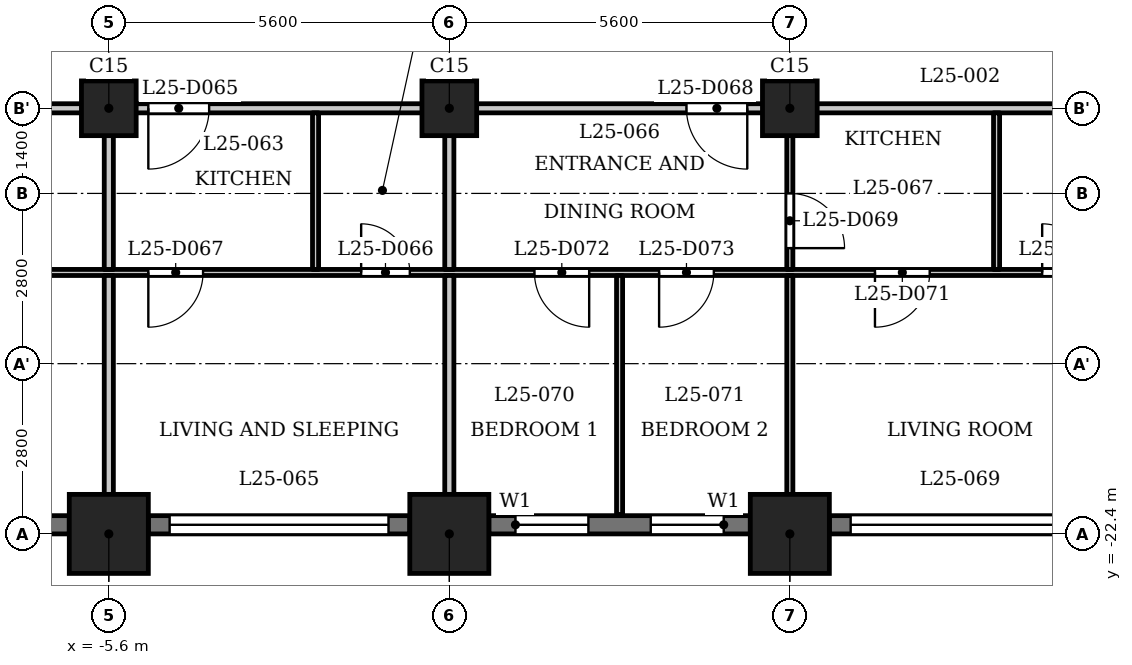
"""IFC4 building model, lengths in metres.
Left out: names, types, materials, properties, quantities, classifications, styles, units other than length and angle.
Written with IfcOpenShell. Run it as: python <this file> out.ifc"""

import sys

from ifc_helpers import new_model, si_unit, direction, frame, frame_2d, origin, origin_2d, place, context, subcontext, project, spatial, rectangle, extrude, element, fill, save


model = new_model("IFC4")
c1 = context("Model", 3, precision=1e-05, world=origin(), true_north=direction((0.0, 1.0)))
c2 = subcontext(c1, "Body", "Model", "MODEL_VIEW")
j1 = project(units=[si_unit("LENGTHUNIT", "METRE"), si_unit("PLANEANGLEUNIT", "RADIAN")], contexts=[c1])
p1 = place(None, origin())
s1 = spatial("IfcSite", under=j1, at=p1, CompositionType="ELEMENT")
p2 = place(p1, origin())
s2 = spatial("IfcBuilding", under=s1, at=p2, CompositionType="ELEMENT")
p3 = place(p2, frame((0.0, 0.0, 100.8)))
s3 = spatial("IfcBuildingStorey", under=s2, at=p3, CompositionType="ELEMENT", Elevation=100.8)
for number, where, z_axis, x_axis in (
    (1, (-5.6, -22.4, 0.0), (0.0, 0.0, 1.0), (1.0, 0.0, 0.0)),
    (2, (0.0, -22.4, 0.0), (0.0, 0.0, 1.0), (1.0, 0.0, 0.0)),
    (3, (5.6, -22.4, 0.0), (0.0, 0.0, 1.0), (1.0, 0.0, 0.0)),
):
    element("IfcColumn", number, at=place(p3, frame(where, z_axis=z_axis, x_axis=x_axis)), inside=s3, PredefinedType="COLUMN", context=c2, shape_type="SweptSolid", body=[
        extrude(rectangle(XDim=1.3, YDim=1.3, at=origin_2d()), origin(), (0.0, 0.0, 1.0), 3.5),
    ])
for number, where, z_axis, x_axis in (
    (4, (-5.6, -15.4, 0.0), (0.0, 0.0, 1.0), (1.0, 0.0, 0.0)),
    (5, (0.0, -15.4, 0.0), (0.0, 0.0, 1.0), (1.0, 0.0, 0.0)),
    (6, (5.6, -15.4, 0.0), (0.0, 0.0, 1.0), (1.0, 0.0, 0.0)),
):
    element("IfcColumn", number, at=place(p3, frame(where, z_axis=z_axis, x_axis=x_axis)), inside=s3, PredefinedType="COLUMN", context=c2, shape_type="SweptSolid", body=[
        extrude(rectangle(XDim=0.9, YDim=0.9, at=origin_2d()), origin(), (0.0, 0.0, 1.0), 3.5),
    ])
p4 = place(p3, frame((-10.55, -22.25, 0.0), z_axis=(0.0, 0.0, 1.0), x_axis=(1.0, 0.0, 0.0)))
e7 = element("IfcWall", 7, at=p4, inside=s3, PredefinedType="SOLIDWALL", context=c2, shape_type="SweptSolid", body=[
    extrude(rectangle(XDim=4.3, YDim=0.3, at=frame_2d((2.15, 0.0))), origin(), (0.0, 0.0, 1.0), 2.4),
])
p5 = place(p4, frame((0.35, 0.0, 1.2)))
e8 = element("IfcOpeningElement", 8, at=p5, cuts=e7, PredefinedType="OPENING", context=c2, shape_type="SweptSolid", body=[
    extrude(rectangle(XDim=3.6, YDim=0.95, at=frame_2d((1.8, 0.475))), frame((0.0, 0.16, 0.0), z_axis=(0.0, -1.0, 0.0), x_axis=(1.0, 0.0, 0.0)), (0.0, 0.0, 1.0), 0.32),
])
p6 = place(p3, frame((-4.95, -22.25, 0.0), z_axis=(0.0, 0.0, 1.0), x_axis=(1.0, 0.0, 0.0)))
e9 = element("IfcWall", 9, at=p6, inside=s3, PredefinedType="SOLIDWALL", context=c2, shape_type="SweptSolid", body=[
    extrude(rectangle(XDim=4.3, YDim=0.3, at=frame_2d((2.15, 0.0))), origin(), (0.0, 0.0, 1.0), 2.4),
])
p7 = place(p6, frame((0.35, 0.0, 1.2)))
e10 = element("IfcOpeningElement", 10, at=p7, cuts=e9, PredefinedType="OPENING", context=c2, shape_type="SweptSolid", body=[
    extrude(rectangle(XDim=3.6, YDim=0.95, at=frame_2d((1.8, 0.475))), frame((0.0, 0.16, 0.0), z_axis=(0.0, -1.0, 0.0), x_axis=(1.0, 0.0, 0.0)), (0.0, 0.0, 1.0), 0.32),
])
p8 = place(p3, frame((0.65, -22.25, 0.0), z_axis=(0.0, 0.0, 1.0), x_axis=(1.0, 0.0, 0.0)))
e11 = element("IfcWall", 11, at=p8, inside=s3, PredefinedType="SOLIDWALL", context=c2, shape_type="SweptSolid", body=[
    extrude(rectangle(XDim=4.3, YDim=0.3, at=frame_2d((2.15, 0.0))), origin(), (0.0, 0.0, 1.0), 2.4),
])
p9 = place(p8, frame((0.438, 0.0, 0.6)))
e12 = element("IfcOpeningElement", 12, at=p9, cuts=e11, PredefinedType="OPENING", context=c2, shape_type="SweptSolid", body=[
    extrude(rectangle(XDim=1.2, YDim=1.55, at=frame_2d((0.6, 0.775))), frame((0.0, 0.16, 0.0), z_axis=(0.0, -1.0, 0.0), x_axis=(1.0, 0.0, 0.0)), (0.0, 0.0, 1.0), 0.32),
])
p10 = place(p8, frame((2.663, 0.0, 0.6)))
e13 = element("IfcOpeningElement", 13, at=p10, cuts=e11, PredefinedType="OPENING", context=c2, shape_type="SweptSolid", body=[
    extrude(rectangle(XDim=1.2, YDim=1.55, at=frame_2d((0.6, 0.775))), frame((0.0, 0.16, 0.0), z_axis=(0.0, -1.0, 0.0), x_axis=(1.0, 0.0, 0.0)), (0.0, 0.0, 1.0), 0.32),
])
p11 = place(p3, frame((6.25, -22.25, 0.0), z_axis=(0.0, 0.0, 1.0), x_axis=(1.0, 0.0, 0.0)))
e14 = element("IfcWall", 14, at=p11, inside=s3, PredefinedType="SOLIDWALL", context=c2, shape_type="SweptSolid", body=[
    extrude(rectangle(XDim=4.3, YDim=0.3, at=frame_2d((2.15, 0.0))), origin(), (0.0, 0.0, 1.0), 2.4),
])
p12 = place(p11, frame((0.35, 0.0, 1.2)))
e15 = element("IfcOpeningElement", 15, at=p12, cuts=e14, PredefinedType="OPENING", context=c2, shape_type="SweptSolid", body=[
    extrude(rectangle(XDim=3.6, YDim=0.95, at=frame_2d((1.8, 0.475))), frame((0.0, 0.16, 0.0), z_axis=(0.0, -1.0, 0.0), x_axis=(1.0, 0.0, 0.0)), (0.0, 0.0, 1.0), 0.32),
])
p13 = place(p3, frame((-26.19, -18.1, 0.0), z_axis=(0.0, 0.0, 1.0), x_axis=(1.0, 0.0, 0.0)))
e16 = element("IfcWall", 16, at=p13, inside=s3, PredefinedType="PARTITIONING", context=c2, shape_type="SweptSolid", body=[
    extrude(rectangle(XDim=52.63, YDim=0.1, at=frame_2d((26.315, 0.0))), origin(), (0.0, 0.0, 1.0), 3.2),
])
p14 = place(p13, frame((1.09, 0.0, 0.0)))
e17 = element("IfcOpeningElement", 17, at=p14, cuts=e16, PredefinedType="OPENING", context=c2, shape_type="SweptSolid", body=[
    extrude(rectangle(XDim=0.8, YDim=2.1, at=frame_2d((0.4, 1.05))), frame((0.0, 0.06, 0.0), z_axis=(0.0, -1.0, 0.0), x_axis=(1.0, 0.0, 0.0)), (0.0, 0.0, 1.0), 0.12),
])
p15 = place(p13, frame((4.44, 0.0, 0.0)))
e18 = element("IfcOpeningElement", 18, at=p15, cuts=e16, PredefinedType="OPENING", context=c2, shape_type="SweptSolid", body=[
    extrude(rectangle(XDim=0.9, YDim=2.1, at=frame_2d((0.45, 1.05))), frame((0.0, 0.06, 0.0), z_axis=(0.0, -1.0, 0.0), x_axis=(1.0, 0.0, 0.0)), (0.0, 0.0, 1.0), 0.12),
])
p16 = place(p13, frame((10.04, 0.0, 0.0)))
e19 = element("IfcOpeningElement", 19, at=p16, cuts=e16, PredefinedType="OPENING", context=c2, shape_type="SweptSolid", body=[
    extrude(rectangle(XDim=0.8, YDim=2.1, at=frame_2d((0.4, 1.05))), frame((0.0, 0.06, 0.0), z_axis=(0.0, -1.0, 0.0), x_axis=(1.0, 0.0, 0.0)), (0.0, 0.0, 1.0), 0.12),
])
p17 = place(p13, frame((15.64, 0.0, 0.0)))
e20 = element("IfcOpeningElement", 20, at=p17, cuts=e16, PredefinedType="OPENING", context=c2, shape_type="SweptSolid", body=[
    extrude(rectangle(XDim=0.9, YDim=2.1, at=frame_2d((0.45, 1.05))), frame((0.0, 0.06, 0.0), z_axis=(0.0, -1.0, 0.0), x_axis=(1.0, 0.0, 0.0)), (0.0, 0.0, 1.0), 0.12),
])
p18 = place(p13, frame((24.74, 0.0, 0.0)))
e21 = element("IfcOpeningElement", 21, at=p18, cuts=e16, PredefinedType="OPENING", context=c2, shape_type="SweptSolid", body=[
    extrude(rectangle(XDim=0.8, YDim=2.1, at=frame_2d((0.4, 1.05))), frame((0.0, 0.06, 0.0), z_axis=(0.0, -1.0, 0.0), x_axis=(1.0, 0.0, 0.0)), (0.0, 0.0, 1.0), 0.12),
])
p19 = place(p13, frame((21.24, 0.0, 0.0)))
e22 = element("IfcOpeningElement", 22, at=p19, cuts=e16, PredefinedType="OPENING", context=c2, shape_type="SweptSolid", body=[
    extrude(rectangle(XDim=0.9, YDim=2.1, at=frame_2d((0.45, 1.05))), frame((0.0, 0.06, 0.0), z_axis=(0.0, -1.0, 0.0), x_axis=(1.0, 0.0, 0.0)), (0.0, 0.0, 1.0), 0.12),
])
p20 = place(p13, frame((35.94, 0.0, 0.0)))
e23 = element("IfcOpeningElement", 23, at=p20, cuts=e16, PredefinedType="OPENING", context=c2, shape_type="SweptSolid", body=[
    extrude(rectangle(XDim=0.8, YDim=2.1, at=frame_2d((0.4, 1.05))), frame((0.0, 0.06, 0.0), z_axis=(0.0, -1.0, 0.0), x_axis=(1.0, 0.0, 0.0)), (0.0, 0.0, 1.0), 0.12),
])
p21 = place(p13, frame((33.19, 0.0, 0.0)))
e24 = element("IfcOpeningElement", 24, at=p21, cuts=e16, PredefinedType="OPENING", context=c2, shape_type="SweptSolid", body=[
    extrude(rectangle(XDim=0.9, YDim=2.1, at=frame_2d((0.45, 1.05))), frame((0.0, 0.06, 0.0), z_axis=(0.0, -1.0, 0.0), x_axis=(1.0, 0.0, 0.0)), (0.0, 0.0, 1.0), 0.12),
])
p22 = place(p13, frame((27.59, 0.0, 0.0)))
e25 = element("IfcOpeningElement", 25, at=p22, cuts=e16, PredefinedType="OPENING", context=c2, shape_type="SweptSolid", body=[
    extrude(rectangle(XDim=0.9, YDim=2.1, at=frame_2d((0.45, 1.05))), frame((0.0, 0.06, 0.0), z_axis=(0.0, -1.0, 0.0), x_axis=(1.0, 0.0, 0.0)), (0.0, 0.0, 1.0), 0.12),
])
p23 = place(p13, frame((29.64, 0.0, 0.0)))
e26 = element("IfcOpeningElement", 26, at=p23, cuts=e16, PredefinedType="OPENING", context=c2, shape_type="SweptSolid", body=[
    extrude(rectangle(XDim=0.9, YDim=2.1, at=frame_2d((0.45, 1.05))), frame((0.0, 0.06, 0.0), z_axis=(0.0, -1.0, 0.0), x_axis=(1.0, 0.0, 0.0)), (0.0, 0.0, 1.0), 0.12),
])
p24 = place(p13, frame((41.54, 0.0, 0.0)))
e27 = element("IfcOpeningElement", 27, at=p24, cuts=e16, PredefinedType="OPENING", context=c2, shape_type="SweptSolid", body=[
    extrude(rectangle(XDim=0.8, YDim=2.1, at=frame_2d((0.4, 1.05))), frame((0.0, 0.06, 0.0), z_axis=(0.0, -1.0, 0.0), x_axis=(1.0, 0.0, 0.0)), (0.0, 0.0, 1.0), 0.12),
])
p25 = place(p13, frame((38.54, 0.0, 0.0)))
e28 = element("IfcOpeningElement", 28, at=p25, cuts=e16, PredefinedType="OPENING", context=c2, shape_type="SweptSolid", body=[
    extrude(rectangle(XDim=0.9, YDim=2.1, at=frame_2d((0.45, 1.05))), frame((0.0, 0.06, 0.0), z_axis=(0.0, -1.0, 0.0), x_axis=(1.0, 0.0, 0.0)), (0.0, 0.0, 1.0), 0.12),
])
p26 = place(p13, frame((49.204, 0.0, 0.0)))
e29 = element("IfcOpeningElement", 29, at=p26, cuts=e16, PredefinedType="OPENING", context=c2, shape_type="SweptSolid", body=[
    extrude(rectangle(XDim=0.8, YDim=2.1, at=frame_2d((0.4, 1.05))), frame((0.0, 0.06, 0.0), z_axis=(0.0, -1.0, 0.0), x_axis=(1.0, 0.0, 0.0)), (0.0, 0.0, 1.0), 0.12),
])
p27 = place(p13, frame((43.64, 0.0, 0.0)))
e30 = element("IfcOpeningElement", 30, at=p27, cuts=e16, PredefinedType="OPENING", context=c2, shape_type="SweptSolid", body=[
    extrude(rectangle(XDim=0.9, YDim=2.1, at=frame_2d((0.45, 1.05))), frame((0.0, 0.06, 0.0), z_axis=(0.0, -1.0, 0.0), x_axis=(1.0, 0.0, 0.0)), (0.0, 0.0, 1.0), 0.12),
])
p28 = place(p3, frame((-27.484, -15.4, 0.0), z_axis=(0.0, 0.0, 1.0), x_axis=(1.0, 0.0, 0.0)))
e31 = element("IfcWall", 31, at=p28, inside=s3, PredefinedType="PARTITIONING", context=c2, shape_type="SweptSolid", body=[
    extrude(rectangle(XDim=54.968, YDim=0.15, at=frame_2d((27.484, 0.0))), origin(), (0.0, 0.0, 1.0), 3.2),
])
p29 = place(p28, frame((5.734, 0.0, 0.0)))
e32 = element("IfcOpeningElement", 32, at=p29, cuts=e31, PredefinedType="OPENING", context=c2, shape_type="SweptSolid", body=[
    extrude(rectangle(XDim=1.0, YDim=2.1, at=frame_2d((0.5, 1.05))), frame((0.0, 0.085, 0.0), z_axis=(0.0, -1.0, 0.0), x_axis=(1.0, 0.0, 0.0)), (0.0, 0.0, 1.0), 0.17),
])
p30 = place(p28, frame((16.934, 0.0, 0.0)))
e33 = element("IfcOpeningElement", 33, at=p30, cuts=e31, PredefinedType="OPENING", context=c2, shape_type="SweptSolid", body=[
    extrude(rectangle(XDim=1.0, YDim=2.1, at=frame_2d((0.5, 1.05))), frame((0.0, 0.085, 0.0), z_axis=(0.0, -1.0, 0.0), x_axis=(1.0, 0.0, 0.0)), (0.0, 0.0, 1.0), 0.17),
])
p31 = place(p28, frame((22.534, 0.0, 0.0)))
e34 = element("IfcOpeningElement", 34, at=p31, cuts=e31, PredefinedType="OPENING", context=c2, shape_type="SweptSolid", body=[
    extrude(rectangle(XDim=1.0, YDim=2.1, at=frame_2d((0.5, 1.05))), frame((0.0, 0.085, 0.0), z_axis=(0.0, -1.0, 0.0), x_axis=(1.0, 0.0, 0.0)), (0.0, 0.0, 1.0), 0.17),
])
p32 = place(p28, frame((31.384, 0.0, 0.0)))
e35 = element("IfcOpeningElement", 35, at=p32, cuts=e31, PredefinedType="OPENING", context=c2, shape_type="SweptSolid", body=[
    extrude(rectangle(XDim=1.0, YDim=2.1, at=frame_2d((0.5, 1.05))), frame((0.0, 0.085, 0.0), z_axis=(0.0, -1.0, 0.0), x_axis=(1.0, 0.0, 0.0)), (0.0, 0.0, 1.0), 0.17),
])
p33 = place(p28, frame((39.584, 0.0, 0.0)))
e36 = element("IfcOpeningElement", 36, at=p33, cuts=e31, PredefinedType="OPENING", context=c2, shape_type="SweptSolid", body=[
    extrude(rectangle(XDim=1.0, YDim=2.1, at=frame_2d((0.5, 1.05))), frame((0.0, 0.085, 0.0), z_axis=(0.0, -1.0, 0.0), x_axis=(1.0, 0.0, 0.0)), (0.0, 0.0, 1.0), 0.17),
])
p34 = place(p28, frame((44.934, 0.0, 0.0)))
e37 = element("IfcOpeningElement", 37, at=p34, cuts=e31, PredefinedType="OPENING", context=c2, shape_type="SweptSolid", body=[
    extrude(rectangle(XDim=1.0, YDim=2.1, at=frame_2d((0.5, 1.05))), frame((0.0, 0.085, 0.0), z_axis=(0.0, -1.0, 0.0), x_axis=(1.0, 0.0, 0.0)), (0.0, 0.0, 1.0), 0.17),
])
p35 = place(p3, frame((-5.6, -23.03, 0.0), z_axis=(0.0, 0.0, 1.0), x_axis=(0.0, 1.0, 0.0)))
e38 = element("IfcWall", 38, at=p35, inside=s3, PredefinedType="PARTITIONING", context=c2, shape_type="SweptSolid", body=[
    extrude(rectangle(XDim=4.88, YDim=0.15, at=frame_2d((2.44, 0.0))), origin(), (0.0, 0.0, 1.0), 3.2),
])
p36 = place(p3, frame((-5.6, -18.05, 0.0), z_axis=(0.0, 0.0, 1.0), x_axis=(0.0, 1.0, 0.0)))
e39 = element("IfcWall", 39, at=p36, inside=s3, PredefinedType="PARTITIONING", context=c2, shape_type="SweptSolid", body=[
    extrude(rectangle(XDim=2.575, YDim=0.15, at=frame_2d((1.288, 0.0))), origin(), (0.0, 0.0, 1.0), 3.2),
])
p37 = place(p3, frame((-2.2, -18.05, 0.0), z_axis=(0.0, 0.0, 1.0), x_axis=(0.0, 1.0, 0.0)))
e40 = element("IfcWall", 40, at=p37, inside=s3, PredefinedType="PARTITIONING", context=c2, shape_type="SweptSolid", body=[
    extrude(rectangle(XDim=2.575, YDim=0.1, at=frame_2d((1.288, 0.0))), origin(), (0.0, 0.0, 1.0), 3.2),
])
p38 = place(p3, frame((0.0, -23.03, 0.0), z_axis=(0.0, 0.0, 1.0), x_axis=(0.0, 1.0, 0.0)))
e41 = element("IfcWall", 41, at=p38, inside=s3, PredefinedType="PARTITIONING", context=c2, shape_type="SweptSolid", body=[
    extrude(rectangle(XDim=4.88, YDim=0.15, at=frame_2d((2.44, 0.0))), origin(), (0.0, 0.0, 1.0), 3.2),
])
p39 = place(p3, frame((0.0, -18.05, 0.0), z_axis=(0.0, 0.0, 1.0), x_axis=(0.0, 1.0, 0.0)))
e42 = element("IfcWall", 42, at=p39, inside=s3, PredefinedType="PARTITIONING", context=c2, shape_type="SweptSolid", body=[
    extrude(rectangle(XDim=2.575, YDim=0.15, at=frame_2d((1.288, 0.0))), origin(), (0.0, 0.0, 1.0), 3.2),
])
p40 = place(p3, frame((2.8, -22.08, 0.0), z_axis=(0.0, 0.0, 1.0), x_axis=(0.0, 1.0, 0.0)))
e43 = element("IfcWall", 43, at=p40, inside=s3, PredefinedType="PARTITIONING", context=c2, shape_type="SweptSolid", body=[
    extrude(rectangle(XDim=3.93, YDim=0.1, at=frame_2d((1.965, 0.0))), origin(), (0.0, 0.0, 1.0), 3.2),
])
p41 = place(p3, frame((5.6, -23.03, 0.0), z_axis=(0.0, 0.0, 1.0), x_axis=(0.0, 1.0, 0.0)))
e44 = element("IfcWall", 44, at=p41, inside=s3, PredefinedType="PARTITIONING", context=c2, shape_type="SweptSolid", body=[
    extrude(rectangle(XDim=4.88, YDim=0.1, at=frame_2d((2.44, 0.0))), origin(), (0.0, 0.0, 1.0), 3.2),
])
p42 = place(p3, frame((5.6, -18.05, 0.0), z_axis=(0.0, 0.0, 1.0), x_axis=(0.0, 1.0, 0.0)))
e45 = element("IfcWall", 45, at=p42, inside=s3, PredefinedType="PARTITIONING", context=c2, shape_type="SweptSolid", body=[
    extrude(rectangle(XDim=2.575, YDim=0.1, at=frame_2d((1.288, 0.0))), origin(), (0.0, 0.0, 1.0), 3.2),
])
p43 = place(p42, frame((0.35, 0.0, 0.0)))
e46 = element("IfcOpeningElement", 46, at=p43, cuts=e45, PredefinedType="OPENING", context=c2, shape_type="SweptSolid", body=[
    extrude(rectangle(XDim=0.9, YDim=2.1, at=frame_2d((0.45, 1.05))), frame((0.0, 0.06, 0.0), z_axis=(0.0, -1.0, 0.0), x_axis=(1.0, 0.0, 0.0)), (0.0, 0.0, 1.0), 0.12),
])
p44 = place(p3, frame((9.0, -18.05, 0.0), z_axis=(0.0, 0.0, 1.0), x_axis=(0.0, 1.0, 0.0)))
e47 = element("IfcWall", 47, at=p44, inside=s3, PredefinedType="PARTITIONING", context=c2, shape_type="SweptSolid", body=[
    extrude(rectangle(XDim=2.575, YDim=0.1, at=frame_2d((1.288, 0.0))), origin(), (0.0, 0.0, 1.0), 3.2),
])
p45 = place(p31, origin())
e48 = element("IfcDoor", 48, at=p45, inside=s3, OperationType="SINGLE_SWING_LEFT", PredefinedType="DOOR", context=c2, shape_type="SweptSolid", body=[
    extrude(rectangle(XDim=1.0, YDim=2.1, at=frame_2d((0.5, 1.05))), frame((0.0, 0.025, 0.0), z_axis=(0.0, -1.0, 0.0), x_axis=(1.0, 0.0, 0.0)), (0.0, 0.0, 1.0), 0.05),
])
fill(e34, e48)
p46 = place(p18, origin())
e49 = element("IfcDoor", 49, at=p46, inside=s3, OperationType="SINGLE_SWING_RIGHT", PredefinedType="DOOR", context=c2, shape_type="SweptSolid", body=[
    extrude(rectangle(XDim=0.8, YDim=2.1, at=frame_2d((0.4, 1.05))), frame((0.0, 0.025, 0.0), z_axis=(0.0, -1.0, 0.0), x_axis=(1.0, 0.0, 0.0)), (0.0, 0.0, 1.0), 0.05),
])
fill(e21, e49)
p47 = place(p19, origin())
e50 = element("IfcDoor", 50, at=p47, inside=s3, OperationType="SINGLE_SWING_LEFT", PredefinedType="DOOR", context=c2, shape_type="SweptSolid", body=[
    extrude(rectangle(XDim=0.9, YDim=2.1, at=frame_2d((0.45, 1.05))), frame((0.0, 0.025, 0.0), z_axis=(0.0, -1.0, 0.0), x_axis=(1.0, 0.0, 0.0)), (0.0, 0.0, 1.0), 0.05),
])
fill(e22, e50)
p48 = place(p32, origin())
e51 = element("IfcDoor", 51, at=p48, inside=s3, OperationType="SINGLE_SWING_RIGHT", PredefinedType="DOOR", context=c2, shape_type="SweptSolid", body=[
    extrude(rectangle(XDim=1.0, YDim=2.1, at=frame_2d((0.5, 1.05))), frame((0.0, 0.025, 0.0), z_axis=(0.0, -1.0, 0.0), x_axis=(1.0, 0.0, 0.0)), (0.0, 0.0, 1.0), 0.05),
])
fill(e35, e51)
p49 = place(p43, origin())
e52 = element("IfcDoor", 52, at=p49, inside=s3, OperationType="SINGLE_SWING_LEFT", PredefinedType="DOOR", context=c2, shape_type="SweptSolid", body=[
    extrude(rectangle(XDim=0.9, YDim=2.1, at=frame_2d((0.45, 1.05))), frame((0.0, 0.025, 0.0), z_axis=(0.0, -1.0, 0.0), x_axis=(1.0, 0.0, 0.0)), (0.0, 0.0, 1.0), 0.05),
])
fill(e46, e52)
p50 = place(p20, origin())
e53 = element("IfcDoor", 53, at=p50, inside=s3, OperationType="SINGLE_SWING_RIGHT", PredefinedType="DOOR", context=c2, shape_type="SweptSolid", body=[
    extrude(rectangle(XDim=0.8, YDim=2.1, at=frame_2d((0.4, 1.05))), frame((0.0, 0.025, 0.0), z_axis=(0.0, -1.0, 0.0), x_axis=(1.0, 0.0, 0.0)), (0.0, 0.0, 1.0), 0.05),
])
fill(e23, e53)
p51 = place(p21, origin())
e54 = element("IfcDoor", 54, at=p51, inside=s3, OperationType="SINGLE_SWING_LEFT", PredefinedType="DOOR", context=c2, shape_type="SweptSolid", body=[
    extrude(rectangle(XDim=0.9, YDim=2.1, at=frame_2d((0.45, 1.05))), frame((0.0, 0.025, 0.0), z_axis=(0.0, -1.0, 0.0), x_axis=(1.0, 0.0, 0.0)), (0.0, 0.0, 1.0), 0.05),
])
fill(e24, e54)
p52 = place(p22, origin())
e55 = element("IfcDoor", 55, at=p52, inside=s3, OperationType="SINGLE_SWING_RIGHT", PredefinedType="DOOR", context=c2, shape_type="SweptSolid", body=[
    extrude(rectangle(XDim=0.9, YDim=2.1, at=frame_2d((0.45, 1.05))), frame((0.0, 0.025, 0.0), z_axis=(0.0, -1.0, 0.0), x_axis=(1.0, 0.0, 0.0)), (0.0, 0.0, 1.0), 0.05),
])
fill(e25, e55)
p53 = place(p23, origin())
e56 = element("IfcDoor", 56, at=p53, inside=s3, OperationType="SINGLE_SWING_LEFT", PredefinedType="DOOR", context=c2, shape_type="SweptSolid", body=[
    extrude(rectangle(XDim=0.9, YDim=2.1, at=frame_2d((0.45, 1.05))), frame((0.0, 0.025, 0.0), z_axis=(0.0, -1.0, 0.0), x_axis=(1.0, 0.0, 0.0)), (0.0, 0.0, 1.0), 0.05),
])
fill(e26, e56)
p54 = place(p7, origin())
e57 = element("IfcWindow", 57, at=p54, inside=s3, PartitioningType="SINGLE_PANEL", PredefinedType="WINDOW", context=c2, shape_type="SweptSolid", body=[
    extrude(rectangle(XDim=3.6, YDim=0.95, at=frame_2d((1.8, 0.475))), frame((0.0, 0.03, 0.0), z_axis=(0.0, -1.0, 0.0), x_axis=(1.0, 0.0, 0.0)), (0.0, 0.0, 1.0), 0.06),
])
fill(e10, e57)
p55 = place(p9, origin())
e58 = element("IfcWindow", 58, at=p55, inside=s3, PartitioningType="SINGLE_PANEL", PredefinedType="WINDOW", context=c2, shape_type="SweptSolid", body=[
    extrude(rectangle(XDim=1.2, YDim=1.55, at=frame_2d((0.6, 0.775))), frame((0.0, 0.03, 0.0), z_axis=(0.0, -1.0, 0.0), x_axis=(1.0, 0.0, 0.0)), (0.0, 0.0, 1.0), 0.06),
])
fill(e12, e58)
p56 = place(p10, origin())
e59 = element("IfcWindow", 59, at=p56, inside=s3, PartitioningType="SINGLE_PANEL", PredefinedType="WINDOW", context=c2, shape_type="SweptSolid", body=[
    extrude(rectangle(XDim=1.2, YDim=1.55, at=frame_2d((0.6, 0.775))), frame((0.0, 0.03, 0.0), z_axis=(0.0, -1.0, 0.0), x_axis=(1.0, 0.0, 0.0)), (0.0, 0.0, 1.0), 0.06),
])
fill(e13, e59)
p57 = place(p12, origin())
e60 = element("IfcWindow", 60, at=p57, inside=s3, PartitioningType="SINGLE_PANEL", PredefinedType="WINDOW", context=c2, shape_type="SweptSolid", body=[
    extrude(rectangle(XDim=3.6, YDim=0.95, at=frame_2d((1.8, 0.475))), frame((0.0, 0.03, 0.0), z_axis=(0.0, -1.0, 0.0), x_axis=(1.0, 0.0, 0.0)), (0.0, 0.0, 1.0), 0.06),
])
fill(e15, e60)
save(model, sys.argv[1])
